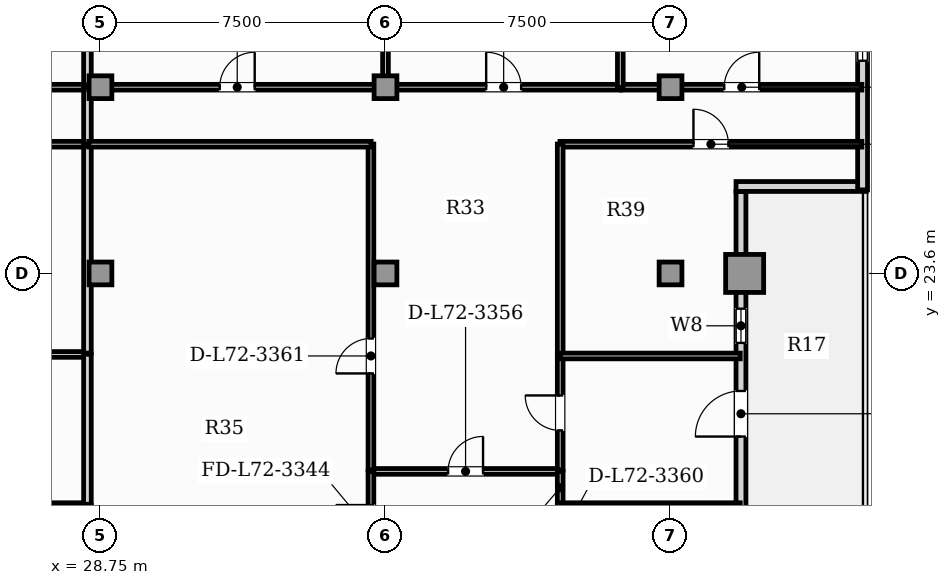
"""IFC4 building model, lengths in metres.
Left out: names, types, materials, properties, quantities, classifications, styles, units other than length and angle.
Written with IfcOpenShell. Run it as: python <this file> out.ifc"""

import sys

from ifc_helpers import new_model, si_unit, direction, frame, frame_2d, origin, origin_2d, place, context, subcontext, project, spatial, rectangle, hollow_rectangle, extrude, element, fill, save


model = new_model("IFC4")
c1 = context("Model", 3, precision=1e-05, world=origin(), true_north=direction((0.0, 1.0)))
c2 = subcontext(c1, "Body", "Model", "MODEL_VIEW")
j1 = project(units=[si_unit("LENGTHUNIT", "METRE"), si_unit("PLANEANGLEUNIT", "RADIAN")], contexts=[c1])
p1 = place(None, origin())
s1 = spatial("IfcSite", under=j1, at=p1, CompositionType="ELEMENT")
p2 = place(p1, origin())
s2 = spatial("IfcBuilding", under=s1, at=p2, CompositionType="ELEMENT")
p3 = place(p2, frame((0.0, 0.0, 292.6)))
s3 = spatial("IfcBuildingStorey", under=s2, at=p3, CompositionType="ELEMENT", Elevation=292.6)
p4 = place(p3, frame((45.7, 23.6, 0.0), z_axis=(0.0, 0.0, 1.0), x_axis=(1.0, 0.0, 0.0)))
e1 = element("IfcColumn", 1, at=p4, inside=s3, PredefinedType="USERDEFINED", context=c2, shape_type="SweptSolid", body=[
    extrude(hollow_rectangle(XDim=1.0, YDim=1.0, WallThickness=0.06, at=origin_2d()), origin(), (0.0, 0.0, 1.0), 3.85),
])
for number, where, z_axis, x_axis in (
    (2, (28.75, 23.6, 0.0), (0.0, 0.0, 1.0), (1.0, 0.0, 0.0)),
    (3, (36.25, 23.6, 0.0), (0.0, 0.0, 1.0), (1.0, 0.0, 0.0)),
    (4, (43.75, 23.6, 0.0), (0.0, 0.0, 1.0), (1.0, 0.0, 0.0)),
    (5, (28.75, 28.5, 0.0), (0.0, 0.0, 1.0), (1.0, 0.0, 0.0)),
    (6, (36.25, 28.5, 0.0), (0.0, 0.0, 1.0), (1.0, 0.0, 0.0)),
    (7, (43.75, 28.5, 0.0), (0.0, 0.0, 1.0), (1.0, 0.0, 0.0)),
):
    element("IfcColumn", number, at=place(p3, frame(where, z_axis=z_axis, x_axis=x_axis)), inside=s3, PredefinedType="COLUMN", context=c2, shape_type="SweptSolid", body=[
        extrude(rectangle(XDim=0.6, YDim=0.6, at=origin_2d()), origin(), (0.0, 0.0, 1.0), 3.85),
    ])
p5 = place(p3, frame((45.604, 16.758, 0.0), z_axis=(0.0, 0.0, 1.0), x_axis=(0.0, 1.0, 0.0)))
e8 = element("IfcWall", 8, at=p5, inside=s3, PredefinedType="SOLIDWALL", context=c2, shape_type="SweptSolid", body=[
    extrude(rectangle(XDim=9.0, YDim=0.26, at=frame_2d((4.5, 0.0))), origin(), (0.0, 0.0, 1.0), 3.19),
])
p6 = place(p5, frame((2.55, 0.0, 0.0)))
e9 = element("IfcOpeningElement", 9, at=p6, cuts=e8, PredefinedType="OPENING", context=c2, shape_type="SweptSolid", body=[
    extrude(rectangle(XDim=1.2, YDim=2.2, at=frame_2d((0.6, 1.1))), frame((0.0, 0.14, 0.0), z_axis=(0.0, -1.0, 0.0), x_axis=(1.0, 0.0, 0.0)), (0.0, 0.0, 1.0), 0.28),
])
p7 = place(p5, frame((5.014, 0.0, 0.85)))
e10 = element("IfcOpeningElement", 10, at=p7, cuts=e8, PredefinedType="OPENING", context=c2, shape_type="SweptSolid", body=[
    extrude(rectangle(XDim=0.9, YDim=1.4, at=frame_2d((0.45, 0.7))), frame((0.0, 0.14, 0.0), z_axis=(0.0, -1.0, 0.0), x_axis=(1.0, 0.0, 0.0)), (0.0, 0.0, 1.0), 0.28),
])
p8 = place(p3, frame((45.474, 25.888, 0.0), z_axis=(0.0, 0.0, 1.0), x_axis=(1.0, 0.0, 0.0)))
e11 = element("IfcWall", 11, at=p8, inside=s3, PredefinedType="SOLIDWALL", context=c2, shape_type="SweptSolid", body=[
    extrude(rectangle(XDim=3.42, YDim=0.26, at=frame_2d((1.71, 0.0))), origin(), (0.0, 0.0, 1.0), 3.65),
])
p9 = place(p3, frame((48.804, 25.798, 0.0), z_axis=(0.0, 0.0, 1.0), x_axis=(0.0, 1.0, 0.0)))
e12 = element("IfcWall", 12, at=p9, inside=s3, PredefinedType="SOLIDWALL", context=c2, shape_type="SweptSolid", body=[
    extrude(rectangle(XDim=5.078, YDim=0.26, at=frame_2d((2.539, 0.0))), origin(), (0.0, 0.0, 1.0), 3.65),
])
p10 = place(p9, frame((3.398, 0.0, 0.95)))
e13 = element("IfcOpeningElement", 13, at=p10, cuts=e12, PredefinedType="OPENING", context=c2, shape_type="SweptSolid", body=[
    extrude(rectangle(XDim=0.9, YDim=1.5, at=frame_2d((0.45, 0.75))), frame((0.0, 0.14, 0.0), z_axis=(0.0, -1.0, 0.0), x_axis=(1.0, 0.0, 0.0)), (0.0, 0.0, 1.0), 0.28),
])
p11 = place(p3, frame((21.328, 27.0, 0.0), z_axis=(0.0, 0.0, 1.0), x_axis=(1.0, 0.0, 0.0)))
e14 = element("IfcWall", 14, at=p11, inside=s3, PredefinedType="PARTITIONING", context=c2, shape_type="SweptSolid", body=[
    extrude(rectangle(XDim=7.085, YDim=0.15, at=frame_2d((3.542, 0.0))), origin(), (0.0, 0.0, 1.0), 3.65),
])
p12 = place(p11, frame((3.083, 0.0, 0.0)))
e15 = element("IfcOpeningElement", 15, at=p12, cuts=e14, PredefinedType="OPENING", context=c2, shape_type="SweptSolid", body=[
    extrude(rectangle(XDim=0.92, YDim=2.1, at=frame_2d((0.46, 1.05))), frame((0.0, 0.085, 0.0), z_axis=(0.0, -1.0, 0.0), x_axis=(1.0, 0.0, 0.0)), (0.0, 0.0, 1.0), 0.17),
])
p13 = place(p3, frame((22.864, 28.5, 0.0), z_axis=(0.0, 0.0, 1.0), x_axis=(1.0, 0.0, 0.0)))
e16 = element("IfcWall", 16, at=p13, inside=s3, PredefinedType="PARTITIONING", context=c2, shape_type="SweptSolid", body=[
    extrude(rectangle(XDim=5.549, YDim=0.15, at=frame_2d((2.775, 0.0))), origin(), (0.0, 0.0, 1.0), 3.117),
])
p14 = place(p13, frame((2.315, 0.0, 0.0)))
e17 = element("IfcOpeningElement", 17, at=p14, cuts=e16, PredefinedType="OPENING", context=c2, shape_type="SweptSolid", body=[
    extrude(rectangle(XDim=0.92, YDim=2.1, at=frame_2d((0.46, 1.05))), frame((0.0, 0.085, 0.0), z_axis=(0.0, -1.0, 0.0), x_axis=(1.0, 0.0, 0.0)), (0.0, 0.0, 1.0), 0.17),
])
p15 = place(p3, frame((28.408, 26.995, 0.0), z_axis=(0.0, 0.0, 1.0), x_axis=(0.0, 1.0, 0.0)))
e18 = element("IfcWall", 18, at=p15, inside=s3, PredefinedType="PARTITIONING", context=c2, shape_type="SweptSolid", body=[
    extrude(rectangle(XDim=1.51, YDim=0.2, at=frame_2d((0.755, 0.0))), origin(), (0.0, 0.0, 1.0), 3.65),
])
p16 = place(p3, frame((21.328, 17.49, 0.0), z_axis=(0.0, 0.0, 1.0), x_axis=(1.0, 0.0, 0.0)))
e19 = element("IfcWall", 19, at=p16, inside=s3, PredefinedType="PARTITIONING", context=c2, shape_type="SweptSolid", body=[
    extrude(rectangle(XDim=7.085, YDim=0.15, at=frame_2d((3.542, 0.0))), origin(), (0.0, 0.0, 1.0), 3.65),
])
p17 = place(p3, frame((28.408, 15.695, 0.0), z_axis=(0.0, 0.0, 1.0), x_axis=(0.0, 1.0, 0.0)))
e20 = element("IfcWall", 20, at=p17, inside=s3, PredefinedType="PARTITIONING", context=c2, shape_type="SweptSolid", body=[
    extrude(rectangle(XDim=1.8, YDim=0.2, at=frame_2d((0.9, 0.0))), origin(), (0.0, 0.0, 1.0), 3.65),
])
p18 = place(p3, frame((21.328, 21.469, 0.0), z_axis=(0.0, 0.0, 1.0), x_axis=(1.0, 0.0, 0.0)))
e21 = element("IfcWall", 21, at=p18, inside=s3, PredefinedType="PARTITIONING", context=c2, shape_type="SweptSolid", body=[
    extrude(rectangle(XDim=7.085, YDim=0.15, at=frame_2d((3.542, 0.0))), origin(), (0.0, 0.0, 1.0), 3.65),
])
p19 = place(p3, frame((28.408, 17.525, 0.0), z_axis=(0.0, 0.0, 1.0), x_axis=(0.0, 1.0, 0.0)))
e22 = element("IfcWall", 22, at=p19, inside=s3, PredefinedType="PARTITIONING", context=c2, shape_type="SweptSolid", body=[
    extrude(rectangle(XDim=3.948, YDim=0.2, at=frame_2d((1.974, 0.0))), origin(), (0.0, 0.0, 1.0), 3.65),
])
p20 = place(p3, frame((28.408, 21.503, 0.0), z_axis=(0.0, 0.0, 1.0), x_axis=(0.0, 1.0, 0.0)))
e23 = element("IfcWall", 23, at=p20, inside=s3, PredefinedType="PARTITIONING", context=c2, shape_type="SweptSolid", body=[
    extrude(rectangle(XDim=5.462, YDim=0.2, at=frame_2d((2.731, 0.0))), origin(), (0.0, 0.0, 1.0), 3.65),
])
p21 = place(p3, frame((28.408, 28.535, 0.0), z_axis=(0.0, 0.0, 1.0), x_axis=(0.0, 1.0, 0.0)))
e24 = element("IfcWall", 24, at=p21, inside=s3, PredefinedType="PARTITIONING", context=c2, shape_type="SweptSolid", body=[
    extrude(rectangle(XDim=5.431, YDim=0.2, at=frame_2d((2.716, 0.0))), origin(), (0.0, 0.0, 1.0), 3.65),
])
p22 = place(p3, frame((35.862, 18.391, 0.0), z_axis=(0.0, 0.0, 1.0), x_axis=(1.0, 0.0, 0.0)))
e25 = element("IfcWall", 25, at=p22, inside=s3, PredefinedType="PARTITIONING", context=c2, shape_type="SweptSolid", body=[
    extrude(rectangle(XDim=4.99, YDim=0.15, at=frame_2d((2.495, 0.0))), origin(), (0.0, 0.0, 1.0), 3.65),
])
p23 = place(p22, frame((2.035, 0.0, 0.0)))
e26 = element("IfcOpeningElement", 26, at=p23, cuts=e25, PredefinedType="OPENING", context=c2, shape_type="SweptSolid", body=[
    extrude(rectangle(XDim=0.92, YDim=2.1, at=frame_2d((0.46, 1.05))), frame((0.0, 0.085, 0.0), z_axis=(0.0, -1.0, 0.0), x_axis=(1.0, 0.0, 0.0)), (0.0, 0.0, 1.0), 0.17),
])
p24 = place(p3, frame((35.867, 15.695, 0.0), z_axis=(0.0, 0.0, 1.0), x_axis=(0.0, 1.0, 0.0)))
e27 = element("IfcWall", 27, at=p24, inside=s3, PredefinedType="PARTITIONING", context=c2, shape_type="SweptSolid", body=[
    extrude(rectangle(XDim=2.701, YDim=0.15, at=frame_2d((1.351, 0.0))), origin(), (0.0, 0.0, 1.0), 3.65),
])
p25 = place(p24, frame((0.891, 0.0, 0.0)))
e28 = element("IfcOpeningElement", 28, at=p25, cuts=e27, PredefinedType="OPENING", context=c2, shape_type="SweptSolid", body=[
    extrude(rectangle(XDim=0.92, YDim=2.1, at=frame_2d((0.46, 1.05))), frame((0.0, 0.085, 0.0), z_axis=(0.0, -1.0, 0.0), x_axis=(1.0, 0.0, 0.0)), (0.0, 0.0, 1.0), 0.17),
])
p26 = place(p3, frame((40.847, 15.695, 0.0), z_axis=(0.0, 0.0, 1.0), x_axis=(0.0, 1.0, 0.0)))
e29 = element("IfcWall", 29, at=p26, inside=s3, PredefinedType="PARTITIONING", context=c2, shape_type="SweptSolid", body=[
    extrude(rectangle(XDim=1.8, YDim=0.15, at=frame_2d((0.9, 0.0))), origin(), (0.0, 0.0, 1.0), 3.65),
])
p27 = place(p26, frame((0.44, 0.0, 0.0)))
e30 = element("IfcOpeningElement", 30, at=p27, cuts=e29, PredefinedType="OPENING", context=c2, shape_type="SweptSolid", body=[
    extrude(rectangle(XDim=0.92, YDim=2.1, at=frame_2d((0.46, 1.05))), frame((0.0, 0.085, 0.0), z_axis=(0.0, -1.0, 0.0), x_axis=(1.0, 0.0, 0.0)), (0.0, 0.0, 1.0), 0.17),
])
p28 = place(p3, frame((40.847, 17.525, 0.0), z_axis=(0.0, 0.0, 1.0), x_axis=(0.0, 1.0, 0.0)))
e31 = element("IfcWall", 31, at=p28, inside=s3, PredefinedType="PARTITIONING", context=c2, shape_type="SweptSolid", body=[
    extrude(rectangle(XDim=0.871, YDim=0.15, at=frame_2d((0.436, 0.0))), origin(), (0.0, 0.0, 1.0), 3.65),
])
p29 = place(p3, frame((35.867, 18.426, 0.0), z_axis=(0.0, 0.0, 1.0), x_axis=(0.0, 1.0, 0.0)))
e32 = element("IfcWall", 32, at=p29, inside=s3, PredefinedType="PARTITIONING", context=c2, shape_type="SweptSolid", body=[
    extrude(rectangle(XDim=8.579, YDim=0.15, at=frame_2d((4.289, 0.0))), origin(), (0.0, 0.0, 1.0), 3.65),
])
p30 = place(p29, frame((2.542, 0.0, 0.0)))
e33 = element("IfcOpeningElement", 33, at=p30, cuts=e32, PredefinedType="OPENING", context=c2, shape_type="SweptSolid", body=[
    extrude(rectangle(XDim=0.92, YDim=2.1, at=frame_2d((0.46, 1.05))), frame((0.0, 0.085, 0.0), z_axis=(0.0, -1.0, 0.0), x_axis=(1.0, 0.0, 0.0)), (0.0, 0.0, 1.0), 0.17),
])
p31 = place(p3, frame((28.443, 27.0, 0.0), z_axis=(0.0, 0.0, 1.0), x_axis=(1.0, 0.0, 0.0)))
e34 = element("IfcWall", 34, at=p31, inside=s3, PredefinedType="PARTITIONING", context=c2, shape_type="SweptSolid", body=[
    extrude(rectangle(XDim=7.429, YDim=0.15, at=frame_2d((3.715, 0.0))), origin(), (0.0, 0.0, 1.0), 3.65),
])
p32 = place(p3, frame((40.847, 18.426, 0.0), z_axis=(0.0, 0.0, 1.0), x_axis=(0.0, 1.0, 0.0)))
e35 = element("IfcWall", 35, at=p32, inside=s3, PredefinedType="PARTITIONING", context=c2, shape_type="SweptSolid", body=[
    extrude(rectangle(XDim=3.007, YDim=0.15, at=frame_2d((1.503, 0.0))), origin(), (0.0, 0.0, 1.0), 3.65),
])
p33 = place(p32, frame((1.043, 0.0, 0.0)))
e36 = element("IfcOpeningElement", 36, at=p33, cuts=e35, PredefinedType="OPENING", context=c2, shape_type="SweptSolid", body=[
    extrude(rectangle(XDim=0.92, YDim=2.1, at=frame_2d((0.46, 1.05))), frame((0.0, 0.085, 0.0), z_axis=(0.0, -1.0, 0.0), x_axis=(1.0, 0.0, 0.0)), (0.0, 0.0, 1.0), 0.17),
])
p34 = place(p3, frame((40.842, 27.0, 0.0), z_axis=(0.0, 0.0, 1.0), x_axis=(1.0, 0.0, 0.0)))
e37 = element("IfcWall", 37, at=p34, inside=s3, PredefinedType="PARTITIONING", context=c2, shape_type="SweptSolid", body=[
    extrude(rectangle(XDim=7.942, YDim=0.15, at=frame_2d((3.971, 0.0))), origin(), (0.0, 0.0, 1.0), 3.65),
])
p35 = place(p34, frame((3.511, 0.0, 0.0)))
e38 = element("IfcOpeningElement", 38, at=p35, cuts=e37, PredefinedType="OPENING", context=c2, shape_type="SweptSolid", body=[
    extrude(rectangle(XDim=0.92, YDim=2.1, at=frame_2d((0.46, 1.05))), frame((0.0, 0.085, 0.0), z_axis=(0.0, -1.0, 0.0), x_axis=(1.0, 0.0, 0.0)), (0.0, 0.0, 1.0), 0.17),
])
p36 = place(p3, frame((40.847, 21.463, 0.0), z_axis=(0.0, 0.0, 1.0), x_axis=(0.0, 1.0, 0.0)))
e39 = element("IfcWall", 39, at=p36, inside=s3, PredefinedType="PARTITIONING", context=c2, shape_type="SweptSolid", body=[
    extrude(rectangle(XDim=5.542, YDim=0.15, at=frame_2d((2.771, 0.0))), origin(), (0.0, 0.0, 1.0), 3.65),
])
p37 = place(p3, frame((28.443, 28.5, 0.0), z_axis=(0.0, 0.0, 1.0), x_axis=(1.0, 0.0, 0.0)))
e40 = element("IfcWall", 40, at=p37, inside=s3, PredefinedType="PARTITIONING", context=c2, shape_type="SweptSolid", body=[
    extrude(rectangle(XDim=7.812, YDim=0.15, at=frame_2d((3.906, 0.0))), origin(), (0.0, 0.0, 1.0), 3.117),
])
p38 = place(p37, frame((3.446, 0.0, 0.0)))
e41 = element("IfcOpeningElement", 41, at=p38, cuts=e40, PredefinedType="OPENING", context=c2, shape_type="SweptSolid", body=[
    extrude(rectangle(XDim=0.92, YDim=2.1, at=frame_2d((0.46, 1.05))), frame((0.0, 0.085, 0.0), z_axis=(0.0, -1.0, 0.0), x_axis=(1.0, 0.0, 0.0)), (0.0, 0.0, 1.0), 0.17),
])
p39 = place(p3, frame((36.285, 28.5, 0.0), z_axis=(0.0, 0.0, 1.0), x_axis=(1.0, 0.0, 0.0)))
e42 = element("IfcWall", 42, at=p39, inside=s3, PredefinedType="PARTITIONING", context=c2, shape_type="SweptSolid", body=[
    extrude(rectangle(XDim=6.149, YDim=0.15, at=frame_2d((3.074, 0.0))), origin(), (0.0, 0.0, 1.0), 3.117),
])
p40 = place(p39, frame((2.614, 0.0, 0.0)))
e43 = element("IfcOpeningElement", 43, at=p40, cuts=e42, PredefinedType="OPENING", context=c2, shape_type="SweptSolid", body=[
    extrude(rectangle(XDim=0.92, YDim=2.1, at=frame_2d((0.46, 1.05))), frame((0.0, 0.085, 0.0), z_axis=(0.0, -1.0, 0.0), x_axis=(1.0, 0.0, 0.0)), (0.0, 0.0, 1.0), 0.17),
])
p41 = place(p3, frame((42.464, 28.5, 0.0), z_axis=(0.0, 0.0, 1.0), x_axis=(1.0, 0.0, 0.0)))
e44 = element("IfcWall", 44, at=p41, inside=s3, PredefinedType="PARTITIONING", context=c2, shape_type="SweptSolid", body=[
    extrude(rectangle(XDim=6.321, YDim=0.15, at=frame_2d((3.16, 0.0))), origin(), (0.0, 0.0, 1.0), 3.117),
])
p42 = place(p41, frame((2.7, 0.0, 0.0)))
e45 = element("IfcOpeningElement", 45, at=p42, cuts=e44, PredefinedType="OPENING", context=c2, shape_type="SweptSolid", body=[
    extrude(rectangle(XDim=0.92, YDim=2.1, at=frame_2d((0.46, 1.05))), frame((0.0, 0.085, 0.0), z_axis=(0.0, -1.0, 0.0), x_axis=(1.0, 0.0, 0.0)), (0.0, 0.0, 1.0), 0.17),
])
for number, where, z_axis, x_axis in (
    (46, (40.842, 17.49, 0.0), (0.0, 0.0, 1.0), (1.0, 0.0, 0.0)),
    (47, (40.842, 21.428, 0.0), (0.0, 0.0, 1.0), (1.0, 0.0, 0.0)),
):
    element("IfcWall", number, at=place(p3, frame(where, z_axis=z_axis, x_axis=x_axis)), inside=s3, PredefinedType="PARTITIONING", context=c2, shape_type="SweptSolid", body=[
        extrude(rectangle(XDim=4.742, YDim=0.15, at=frame_2d((2.371, 0.0))), origin(), (0.0, 0.0, 1.0), 3.65),
    ])
for number, where, z_axis, x_axis in (
    (48, (36.25, 28.495, 0.0), (0.0, 0.0, 1.0), (0.0, 1.0, 0.0)),
    (49, (42.429, 28.495, 0.0), (0.0, 0.0, 1.0), (0.0, 1.0, 0.0)),
):
    element("IfcWall", number, at=place(p3, frame(where, z_axis=z_axis, x_axis=x_axis)), inside=s3, PredefinedType="PARTITIONING", context=c2, shape_type="SweptSolid", body=[
        extrude(rectangle(XDim=5.471, YDim=0.15, at=frame_2d((2.735, 0.0))), origin(), (0.0, 0.0, 1.0), 3.65),
    ])
p43 = place(p6, frame((1.2, 0.0, 0.0), z_axis=(0.0, 0.0, 1.0), x_axis=(-1.0, 0.0, 0.0)))
e50 = element("IfcDoor", 50, at=p43, inside=s3, OperationType="SINGLE_SWING_RIGHT", PredefinedType="DOOR", context=c2, shape_type="SweptSolid", body=[
    extrude(rectangle(XDim=1.2, YDim=2.2, at=frame_2d((0.6, 1.1))), frame((0.0, 0.025, 0.0), z_axis=(0.0, -1.0, 0.0), x_axis=(1.0, 0.0, 0.0)), (0.0, 0.0, 1.0), 0.05),
])
fill(e9, e50)
p44 = place(p7, origin())
e51 = element("IfcWindow", 51, at=p44, inside=s3, PartitioningType="SINGLE_PANEL", PredefinedType="WINDOW", context=c2, shape_type="SweptSolid", body=[
    extrude(rectangle(XDim=0.9, YDim=1.4, at=frame_2d((0.45, 0.7))), frame((0.0, 0.03, 0.0), z_axis=(0.0, -1.0, 0.0), x_axis=(1.0, 0.0, 0.0)), (0.0, 0.0, 1.0), 0.06),
])
fill(e10, e51)
p45 = place(p10, origin())
e52 = element("IfcWindow", 52, at=p45, inside=s3, PartitioningType="SINGLE_PANEL", PredefinedType="WINDOW", context=c2, shape_type="SweptSolid", body=[
    extrude(rectangle(XDim=0.9, YDim=1.5, at=frame_2d((0.45, 0.75))), frame((0.0, 0.03, 0.0), z_axis=(0.0, -1.0, 0.0), x_axis=(1.0, 0.0, 0.0)), (0.0, 0.0, 1.0), 0.06),
])
fill(e13, e52)
p46 = place(p23, origin())
e53 = element("IfcDoor", 53, at=p46, inside=s3, OperationType="SINGLE_SWING_RIGHT", PredefinedType="DOOR", context=c2, shape_type="SweptSolid", body=[
    extrude(rectangle(XDim=0.92, YDim=2.1, at=frame_2d((0.46, 1.05))), frame((0.0, 0.025, 0.0), z_axis=(0.0, -1.0, 0.0), x_axis=(1.0, 0.0, 0.0)), (0.0, 0.0, 1.0), 0.05),
])
fill(e26, e53)
p47 = place(p25, origin())
e54 = element("IfcDoor", 54, at=p47, inside=s3, OperationType="SINGLE_SWING_RIGHT", PredefinedType="DOOR", context=c2, shape_type="SweptSolid", body=[
    extrude(rectangle(XDim=0.92, YDim=2.1, at=frame_2d((0.46, 1.05))), frame((0.0, 0.025, 0.0), z_axis=(0.0, -1.0, 0.0), x_axis=(1.0, 0.0, 0.0)), (0.0, 0.0, 1.0), 0.05),
])
fill(e28, e54)
p48 = place(p30, origin())
e55 = element("IfcDoor", 55, at=p48, inside=s3, OperationType="SINGLE_SWING_LEFT", PredefinedType="DOOR", context=c2, shape_type="SweptSolid", body=[
    extrude(rectangle(XDim=0.92, YDim=2.1, at=frame_2d((0.46, 1.05))), frame((0.0, 0.025, 0.0), z_axis=(0.0, -1.0, 0.0), x_axis=(1.0, 0.0, 0.0)), (0.0, 0.0, 1.0), 0.05),
])
fill(e33, e55)
p49 = place(p33, origin())
e56 = element("IfcDoor", 56, at=p49, inside=s3, OperationType="SINGLE_SWING_RIGHT", PredefinedType="DOOR", context=c2, shape_type="SweptSolid", body=[
    extrude(rectangle(XDim=0.92, YDim=2.1, at=frame_2d((0.46, 1.05))), frame((0.0, 0.025, 0.0), z_axis=(0.0, -1.0, 0.0), x_axis=(1.0, 0.0, 0.0)), (0.0, 0.0, 1.0), 0.05),
])
fill(e36, e56)
p50 = place(p35, origin())
e57 = element("IfcDoor", 57, at=p50, inside=s3, OperationType="SINGLE_SWING_LEFT", PredefinedType="DOOR", context=c2, shape_type="SweptSolid", body=[
    extrude(rectangle(XDim=0.92, YDim=2.1, at=frame_2d((0.46, 1.05))), frame((0.0, 0.025, 0.0), z_axis=(0.0, -1.0, 0.0), x_axis=(1.0, 0.0, 0.0)), (0.0, 0.0, 1.0), 0.05),
])
fill(e38, e57)
p51 = place(p38, origin())
e58 = element("IfcDoor", 58, at=p51, inside=s3, OperationType="SINGLE_SWING_RIGHT", PredefinedType="DOOR", context=c2, shape_type="SweptSolid", body=[
    extrude(rectangle(XDim=0.92, YDim=2.1, at=frame_2d((0.46, 1.05))), frame((0.0, 0.025, 0.0), z_axis=(0.0, -1.0, 0.0), x_axis=(1.0, 0.0, 0.0)), (0.0, 0.0, 1.0), 0.05),
])
fill(e41, e58)
p52 = place(p40, origin())
e59 = element("IfcDoor", 59, at=p52, inside=s3, OperationType="SINGLE_SWING_LEFT", PredefinedType="DOOR", context=c2, shape_type="SweptSolid", body=[
    extrude(rectangle(XDim=0.92, YDim=2.1, at=frame_2d((0.46, 1.05))), frame((0.0, 0.025, 0.0), z_axis=(0.0, -1.0, 0.0), x_axis=(1.0, 0.0, 0.0)), (0.0, 0.0, 1.0), 0.05),
])
fill(e43, e59)
p53 = place(p42, origin())
e60 = element("IfcDoor", 60, at=p53, inside=s3, OperationType="SINGLE_SWING_RIGHT", PredefinedType="DOOR", context=c2, shape_type="SweptSolid", body=[
    extrude(rectangle(XDim=0.92, YDim=2.1, at=frame_2d((0.46, 1.05))), frame((0.0, 0.025, 0.0), z_axis=(0.0, -1.0, 0.0), x_axis=(1.0, 0.0, 0.0)), (0.0, 0.0, 1.0), 0.05),
])
fill(e45, e60)
save(model, sys.argv[1])
